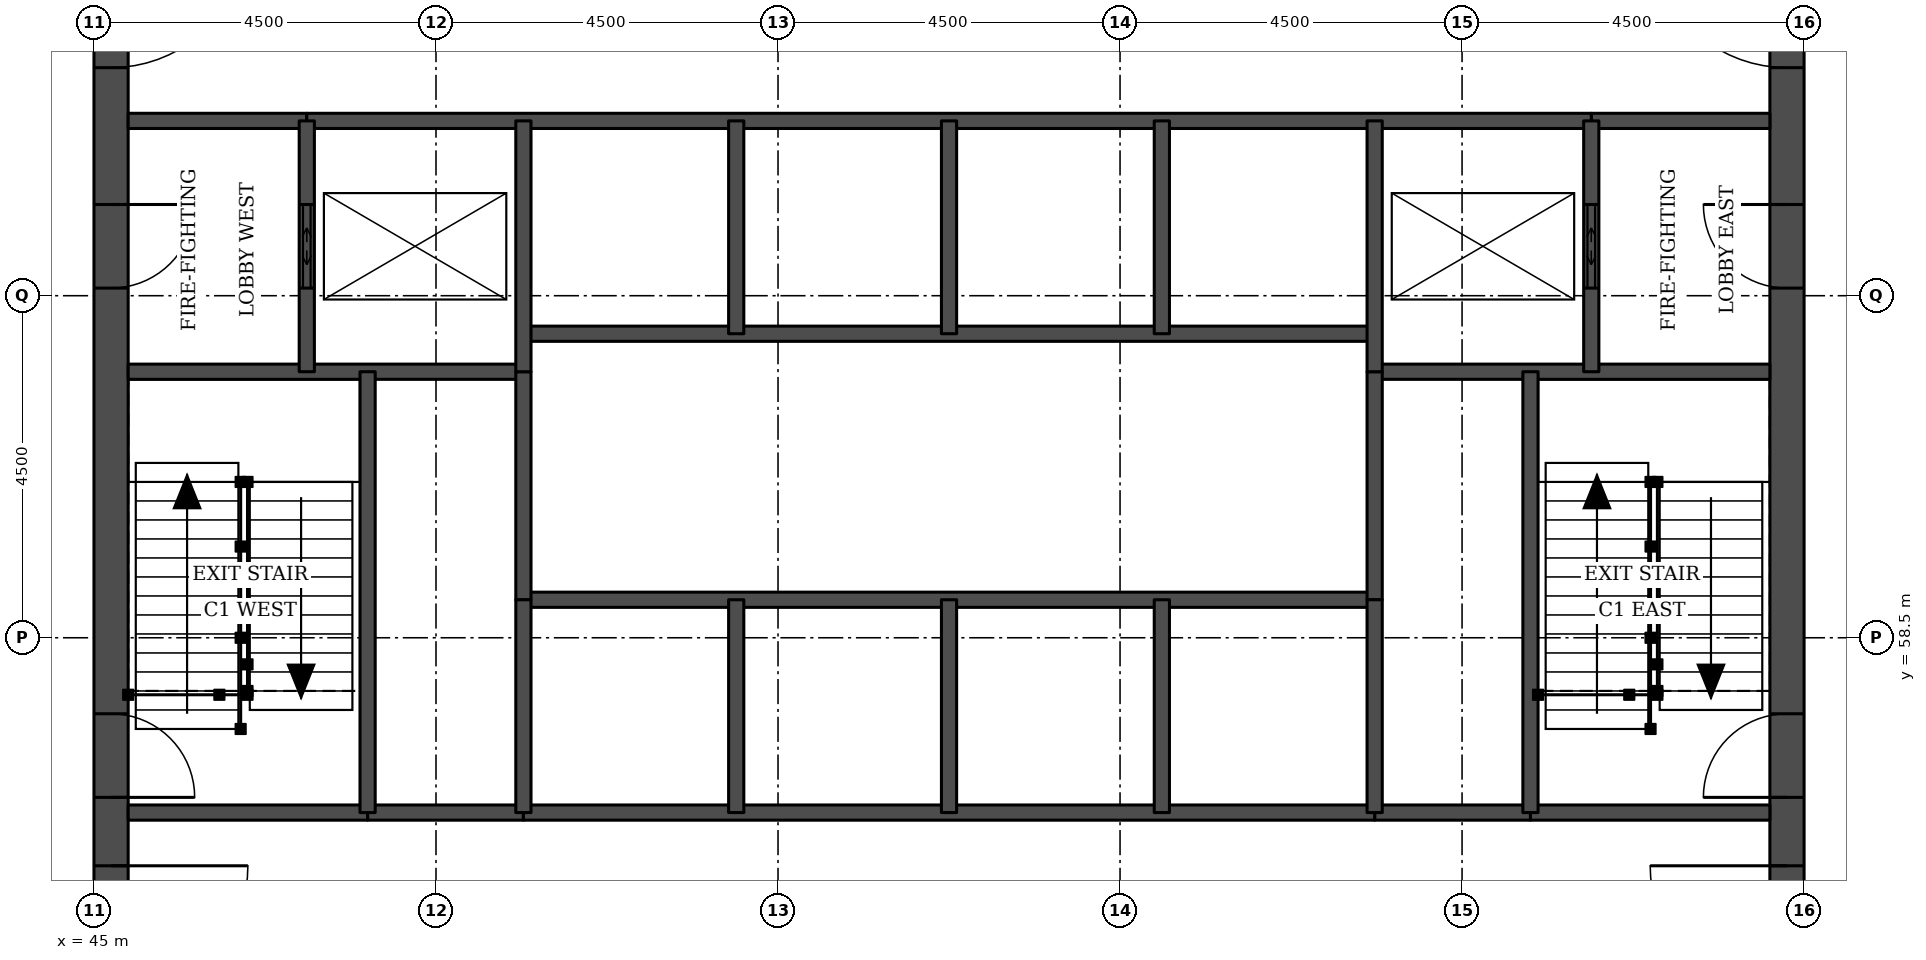
"""IFC4 building model, lengths in metres.
Left out: names, types, materials, properties, quantities, classifications, styles, units other than length and angle.
Written with IfcOpenShell. Run it as: python <this file> out.ifc"""

import sys

from ifc_helpers import new_model, si_unit, direction, frame, frame_2d, origin, place, context, subcontext, project, spatial, rectangle, extrude, element, fill, save


model = new_model("IFC4")
c1 = context("Model", 3, precision=1e-05, world=origin(), true_north=direction((0.0, 1.0)))
c2 = subcontext(c1, "Body", "Model", "MODEL_VIEW")
j1 = project(units=[si_unit("LENGTHUNIT", "METRE"), si_unit("PLANEANGLEUNIT", "RADIAN")], contexts=[c1])
p1 = place(None, origin())
s1 = spatial("IfcSite", under=j1, at=p1, CompositionType="ELEMENT")
p2 = place(p1, origin())
s2 = spatial("IfcBuilding", under=s1, at=p2, CompositionType="ELEMENT")
p3 = place(p2, frame((0.0, 0.0, 130.7)))
s3 = spatial("IfcBuildingStorey", under=s2, at=p3, CompositionType="ELEMENT", Elevation=130.7)
p4 = place(p3, frame((45.225, 49.5, 0.0), z_axis=(0.0, 0.0, 1.0), x_axis=(0.0, 1.0, 0.0)))
e1 = element("IfcWall", 1, at=p4, inside=s3, PredefinedType="SHEAR", context=c2, shape_type="SweptSolid", body=[
    extrude(rectangle(XDim=22.5, YDim=0.45, at=frame_2d((11.25, 0.0))), origin(), (0.0, 0.0, 1.0), 3.7),
])
p5 = place(p4, frame((4.2, 0.0, 0.0)))
e2 = element("IfcOpeningElement", 2, at=p5, cuts=e1, PredefinedType="OPENING", context=c2, shape_type="SweptSolid", body=[
    extrude(rectangle(XDim=1.8, YDim=2.1, at=frame_2d((0.9, 1.05))), frame((0.0, 0.235, 0.0), z_axis=(0.0, -1.0, 0.0), x_axis=(1.0, 0.0, 0.0)), (0.0, 0.0, 1.0), 0.47),
])
p6 = place(p4, frame((6.9, 0.0, 0.0)))
e3 = element("IfcOpeningElement", 3, at=p6, cuts=e1, PredefinedType="OPENING", context=c2, shape_type="SweptSolid", body=[
    extrude(rectangle(XDim=1.1, YDim=2.1, at=frame_2d((0.55, 1.05))), frame((0.0, 0.235, 0.0), z_axis=(0.0, -1.0, 0.0), x_axis=(1.0, 0.0, 0.0)), (0.0, 0.0, 1.0), 0.47),
])
p7 = place(p4, frame((13.6, 0.0, 0.0)))
e4 = element("IfcOpeningElement", 4, at=p7, cuts=e1, PredefinedType="OPENING", context=c2, shape_type="SweptSolid", body=[
    extrude(rectangle(XDim=1.1, YDim=2.1, at=frame_2d((0.55, 1.05))), frame((0.0, 0.235, 0.0), z_axis=(0.0, -1.0, 0.0), x_axis=(1.0, 0.0, 0.0)), (0.0, 0.0, 1.0), 0.47),
])
p8 = place(p4, frame((16.5, 0.0, 0.0)))
e5 = element("IfcOpeningElement", 5, at=p8, cuts=e1, PredefinedType="OPENING", context=c2, shape_type="SweptSolid", body=[
    extrude(rectangle(XDim=1.8, YDim=2.1, at=frame_2d((0.9, 1.05))), frame((0.0, 0.235, 0.0), z_axis=(0.0, -1.0, 0.0), x_axis=(1.0, 0.0, 0.0)), (0.0, 0.0, 1.0), 0.47),
])
p9 = place(p3, frame((67.275, 49.5, 0.0), z_axis=(0.0, 0.0, 1.0), x_axis=(0.0, 1.0, 0.0)))
e6 = element("IfcWall", 6, at=p9, inside=s3, PredefinedType="SHEAR", context=c2, shape_type="SweptSolid", body=[
    extrude(rectangle(XDim=22.5, YDim=0.45, at=frame_2d((11.25, 0.0))), origin(), (0.0, 0.0, 1.0), 3.7),
])
p10 = place(p9, frame((4.2, 0.0, 0.0)))
e7 = element("IfcOpeningElement", 7, at=p10, cuts=e6, PredefinedType="OPENING", context=c2, shape_type="SweptSolid", body=[
    extrude(rectangle(XDim=1.8, YDim=2.1, at=frame_2d((0.9, 1.05))), frame((0.0, 0.235, 0.0), z_axis=(0.0, -1.0, 0.0), x_axis=(1.0, 0.0, 0.0)), (0.0, 0.0, 1.0), 0.47),
])
p11 = place(p9, frame((6.9, 0.0, 0.0)))
e8 = element("IfcOpeningElement", 8, at=p11, cuts=e6, PredefinedType="OPENING", context=c2, shape_type="SweptSolid", body=[
    extrude(rectangle(XDim=1.1, YDim=2.1, at=frame_2d((0.55, 1.05))), frame((0.0, 0.235, 0.0), z_axis=(0.0, -1.0, 0.0), x_axis=(1.0, 0.0, 0.0)), (0.0, 0.0, 1.0), 0.47),
])
p12 = place(p9, frame((13.6, 0.0, 0.0)))
e9 = element("IfcOpeningElement", 9, at=p12, cuts=e6, PredefinedType="OPENING", context=c2, shape_type="SweptSolid", body=[
    extrude(rectangle(XDim=1.1, YDim=2.1, at=frame_2d((0.55, 1.05))), frame((0.0, 0.235, 0.0), z_axis=(0.0, -1.0, 0.0), x_axis=(1.0, 0.0, 0.0)), (0.0, 0.0, 1.0), 0.47),
])
p13 = place(p9, frame((16.5, 0.0, 0.0)))
e10 = element("IfcOpeningElement", 10, at=p13, cuts=e6, PredefinedType="OPENING", context=c2, shape_type="SweptSolid", body=[
    extrude(rectangle(XDim=1.8, YDim=2.1, at=frame_2d((0.9, 1.05))), frame((0.0, 0.235, 0.0), z_axis=(0.0, -1.0, 0.0), x_axis=(1.0, 0.0, 0.0)), (0.0, 0.0, 1.0), 0.47),
])
for number, where, z_axis, x_axis in (
    (11, (48.6, 56.2, 0.0), (0.0, 0.0, 1.0), (1.0, 0.0, 0.0)),
    (12, (61.85, 56.2, 0.0), (0.0, 0.0, 1.0), (1.0, 0.0, 0.0)),
):
    element("IfcWall", number, at=place(p3, frame(where, z_axis=z_axis, x_axis=x_axis)), inside=s3, PredefinedType="SOLIDWALL", context=c2, shape_type="SweptSolid", body=[
        extrude(rectangle(XDim=2.05, YDim=0.2, at=frame_2d((1.025, 0.0))), origin(), (0.0, 0.0, 1.0), 3.55),
    ])
p14 = place(p3, frame((45.45, 56.2, 0.0), z_axis=(0.0, 0.0, 1.0), x_axis=(1.0, 0.0, 0.0)))
e13 = element("IfcWall", 13, at=p14, inside=s3, PredefinedType="SOLIDWALL", context=c2, shape_type="SweptSolid", body=[
    extrude(rectangle(XDim=3.15, YDim=0.2, at=frame_2d((1.575, 0.0))), origin(), (0.0, 0.0, 1.0), 3.55),
])
p15 = place(p3, frame((50.65, 56.2, 0.0), z_axis=(0.0, 0.0, 1.0), x_axis=(1.0, 0.0, 0.0)))
e14 = element("IfcWall", 14, at=p15, inside=s3, PredefinedType="SOLIDWALL", context=c2, shape_type="SweptSolid", body=[
    extrude(rectangle(XDim=11.2, YDim=0.2, at=frame_2d((5.6, 0.0))), origin(), (0.0, 0.0, 1.0), 3.55),
])
p16 = place(p3, frame((63.9, 56.2, 0.0), z_axis=(0.0, 0.0, 1.0), x_axis=(1.0, 0.0, 0.0)))
e15 = element("IfcWall", 15, at=p16, inside=s3, PredefinedType="SOLIDWALL", context=c2, shape_type="SweptSolid", body=[
    extrude(rectangle(XDim=3.15, YDim=0.2, at=frame_2d((1.575, 0.0))), origin(), (0.0, 0.0, 1.0), 3.55),
])
p17 = place(p3, frame((50.65, 59.0, 0.0), z_axis=(0.0, 0.0, 1.0), x_axis=(1.0, 0.0, 0.0)))
e16 = element("IfcWall", 16, at=p17, inside=s3, PredefinedType="SOLIDWALL", context=c2, shape_type="SweptSolid", body=[
    extrude(rectangle(XDim=11.2, YDim=0.2, at=frame_2d((5.6, 0.0))), origin(), (0.0, 0.0, 1.0), 3.7),
])
for number, where, z_axis, x_axis in (
    (17, (45.45, 62.0, 0.0), (0.0, 0.0, 1.0), (1.0, 0.0, 0.0)),
    (18, (61.85, 62.0, 0.0), (0.0, 0.0, 1.0), (1.0, 0.0, 0.0)),
):
    element("IfcWall", number, at=place(p3, frame(where, z_axis=z_axis, x_axis=x_axis)), inside=s3, PredefinedType="SOLIDWALL", context=c2, shape_type="SweptSolid", body=[
        extrude(rectangle(XDim=5.2, YDim=0.2, at=frame_2d((2.6, 0.0))), origin(), (0.0, 0.0, 1.0), 3.55),
    ])
p18 = place(p3, frame((50.65, 62.5, 0.0), z_axis=(0.0, 0.0, 1.0), x_axis=(1.0, 0.0, 0.0)))
e19 = element("IfcWall", 19, at=p18, inside=s3, PredefinedType="SOLIDWALL", context=c2, shape_type="SweptSolid", body=[
    extrude(rectangle(XDim=11.2, YDim=0.2, at=frame_2d((5.6, 0.0))), origin(), (0.0, 0.0, 1.0), 3.7),
])
for number, where, z_axis, x_axis in (
    (20, (45.45, 65.3, 0.0), (0.0, 0.0, 1.0), (1.0, 0.0, 0.0)),
    (21, (64.7, 65.3, 0.0), (0.0, 0.0, 1.0), (1.0, 0.0, 0.0)),
):
    element("IfcWall", number, at=place(p3, frame(where, z_axis=z_axis, x_axis=x_axis)), inside=s3, PredefinedType="SOLIDWALL", context=c2, shape_type="SweptSolid", body=[
        extrude(rectangle(XDim=2.35, YDim=0.2, at=frame_2d((1.175, 0.0))), origin(), (0.0, 0.0, 1.0), 3.55),
    ])
p19 = place(p3, frame((47.8, 65.3, 0.0), z_axis=(0.0, 0.0, 1.0), x_axis=(1.0, 0.0, 0.0)))
e22 = element("IfcWall", 22, at=p19, inside=s3, PredefinedType="SOLIDWALL", context=c2, shape_type="SweptSolid", body=[
    extrude(rectangle(XDim=16.9, YDim=0.2, at=frame_2d((8.45, 0.0))), origin(), (0.0, 0.0, 1.0), 3.55),
])
p20 = place(p3, frame((47.8, 62.0, 0.0), z_axis=(0.0, 0.0, 1.0), x_axis=(0.0, 1.0, 0.0)))
e23 = element("IfcWall", 23, at=p20, inside=s3, PredefinedType="SOLIDWALL", context=c2, shape_type="SweptSolid", body=[
    extrude(rectangle(XDim=3.3, YDim=0.2, at=frame_2d((1.65, 0.0))), origin(), (0.0, 0.0, 1.0), 3.55),
])
p21 = place(p20, frame((1.1, 0.0, 0.0)))
e24 = element("IfcOpeningElement", 24, at=p21, cuts=e23, PredefinedType="OPENING", context=c2, shape_type="SweptSolid", body=[
    extrude(rectangle(XDim=1.1, YDim=2.1, at=frame_2d((0.55, 1.05))), frame((0.0, 0.11, 0.0), z_axis=(0.0, -1.0, 0.0), x_axis=(1.0, 0.0, 0.0)), (0.0, 0.0, 1.0), 0.22),
])
p22 = place(p3, frame((48.6, 56.2, 0.0), z_axis=(0.0, 0.0, 1.0), x_axis=(0.0, 1.0, 0.0)))
e25 = element("IfcWall", 25, at=p22, inside=s3, PredefinedType="SOLIDWALL", context=c2, shape_type="SweptSolid", body=[
    extrude(rectangle(XDim=5.8, YDim=0.2, at=frame_2d((2.9, 0.0))), origin(), (0.0, 0.0, 1.0), 3.55),
])
p23 = place(p3, frame((50.65, 59.0, 0.0), z_axis=(0.0, 0.0, 1.0), x_axis=(0.0, 1.0, 0.0)))
e26 = element("IfcWall", 26, at=p23, inside=s3, PredefinedType="SOLIDWALL", context=c2, shape_type="SweptSolid", body=[
    extrude(rectangle(XDim=3.0, YDim=0.2, at=frame_2d((1.5, 0.0))), origin(), (0.0, 0.0, 1.0), 3.7),
])
p24 = place(p3, frame((50.65, 56.2, 0.0), z_axis=(0.0, 0.0, 1.0), x_axis=(0.0, 1.0, 0.0)))
e27 = element("IfcWall", 27, at=p24, inside=s3, PredefinedType="SOLIDWALL", context=c2, shape_type="SweptSolid", body=[
    extrude(rectangle(XDim=2.8, YDim=0.2, at=frame_2d((1.4, 0.0))), origin(), (0.0, 0.0, 1.0), 3.55),
])
p25 = place(p3, frame((50.65, 62.0, 0.0), z_axis=(0.0, 0.0, 1.0), x_axis=(0.0, 1.0, 0.0)))
e28 = element("IfcWall", 28, at=p25, inside=s3, PredefinedType="SOLIDWALL", context=c2, shape_type="SweptSolid", body=[
    extrude(rectangle(XDim=3.3, YDim=0.2, at=frame_2d((1.65, 0.0))), origin(), (0.0, 0.0, 1.0), 3.55),
])
for number, where, z_axis, x_axis in (
    (29, (53.45, 56.2, 0.0), (0.0, 0.0, 1.0), (0.0, 1.0, 0.0)),
    (30, (53.45, 62.5, 0.0), (0.0, 0.0, 1.0), (0.0, 1.0, 0.0)),
    (31, (56.25, 56.2, 0.0), (0.0, 0.0, 1.0), (0.0, 1.0, 0.0)),
    (32, (56.25, 62.5, 0.0), (0.0, 0.0, 1.0), (0.0, 1.0, 0.0)),
    (33, (59.05, 56.2, 0.0), (0.0, 0.0, 1.0), (0.0, 1.0, 0.0)),
    (34, (59.05, 62.5, 0.0), (0.0, 0.0, 1.0), (0.0, 1.0, 0.0)),
):
    element("IfcWall", number, at=place(p3, frame(where, z_axis=z_axis, x_axis=x_axis)), inside=s3, PredefinedType="SOLIDWALL", context=c2, shape_type="SweptSolid", body=[
        extrude(rectangle(XDim=2.8, YDim=0.2, at=frame_2d((1.4, 0.0))), origin(), (0.0, 0.0, 1.0), 3.55),
    ])
p26 = place(p3, frame((61.85, 59.0, 0.0), z_axis=(0.0, 0.0, 1.0), x_axis=(0.0, 1.0, 0.0)))
e35 = element("IfcWall", 35, at=p26, inside=s3, PredefinedType="SOLIDWALL", context=c2, shape_type="SweptSolid", body=[
    extrude(rectangle(XDim=3.0, YDim=0.2, at=frame_2d((1.5, 0.0))), origin(), (0.0, 0.0, 1.0), 3.7),
])
p27 = place(p3, frame((61.85, 56.2, 0.0), z_axis=(0.0, 0.0, 1.0), x_axis=(0.0, 1.0, 0.0)))
e36 = element("IfcWall", 36, at=p27, inside=s3, PredefinedType="SOLIDWALL", context=c2, shape_type="SweptSolid", body=[
    extrude(rectangle(XDim=2.8, YDim=0.2, at=frame_2d((1.4, 0.0))), origin(), (0.0, 0.0, 1.0), 3.55),
])
p28 = place(p3, frame((61.85, 62.0, 0.0), z_axis=(0.0, 0.0, 1.0), x_axis=(0.0, 1.0, 0.0)))
e37 = element("IfcWall", 37, at=p28, inside=s3, PredefinedType="SOLIDWALL", context=c2, shape_type="SweptSolid", body=[
    extrude(rectangle(XDim=3.3, YDim=0.2, at=frame_2d((1.65, 0.0))), origin(), (0.0, 0.0, 1.0), 3.55),
])
p29 = place(p3, frame((63.9, 56.2, 0.0), z_axis=(0.0, 0.0, 1.0), x_axis=(0.0, 1.0, 0.0)))
e38 = element("IfcWall", 38, at=p29, inside=s3, PredefinedType="SOLIDWALL", context=c2, shape_type="SweptSolid", body=[
    extrude(rectangle(XDim=5.8, YDim=0.2, at=frame_2d((2.9, 0.0))), origin(), (0.0, 0.0, 1.0), 3.55),
])
p30 = place(p3, frame((64.7, 62.0, 0.0), z_axis=(0.0, 0.0, 1.0), x_axis=(0.0, 1.0, 0.0)))
e39 = element("IfcWall", 39, at=p30, inside=s3, PredefinedType="SOLIDWALL", context=c2, shape_type="SweptSolid", body=[
    extrude(rectangle(XDim=3.3, YDim=0.2, at=frame_2d((1.65, 0.0))), origin(), (0.0, 0.0, 1.0), 3.55),
])
p31 = place(p30, frame((1.1, 0.0, 0.0)))
e40 = element("IfcOpeningElement", 40, at=p31, cuts=e39, PredefinedType="OPENING", context=c2, shape_type="SweptSolid", body=[
    extrude(rectangle(XDim=1.1, YDim=2.1, at=frame_2d((0.55, 1.05))), frame((0.0, 0.11, 0.0), z_axis=(0.0, -1.0, 0.0), x_axis=(1.0, 0.0, 0.0)), (0.0, 0.0, 1.0), 0.22),
])
p32 = place(p21, origin())
e41 = element("IfcDoor", 41, at=p32, inside=s3, OperationType="DOUBLE_DOOR_SLIDING", PredefinedType="DOOR", context=c2, shape_type="SweptSolid", body=[
    extrude(rectangle(XDim=1.1, YDim=2.1, at=frame_2d((0.55, 1.05))), frame((0.0, 0.025, 0.0), z_axis=(0.0, -1.0, 0.0), x_axis=(1.0, 0.0, 0.0)), (0.0, 0.0, 1.0), 0.05),
])
fill(e24, e41)
p33 = place(p31, origin())
e42 = element("IfcDoor", 42, at=p33, inside=s3, OperationType="DOUBLE_DOOR_SLIDING", PredefinedType="DOOR", context=c2, shape_type="SweptSolid", body=[
    extrude(rectangle(XDim=1.1, YDim=2.1, at=frame_2d((0.55, 1.05))), frame((0.0, 0.025, 0.0), z_axis=(0.0, -1.0, 0.0), x_axis=(1.0, 0.0, 0.0)), (0.0, 0.0, 1.0), 0.05),
])
fill(e40, e42)
p34 = place(p5, frame((1.8, 0.0, 0.0), z_axis=(0.0, 0.0, 1.0), x_axis=(-1.0, 0.0, 0.0)))
e43 = element("IfcDoor", 43, at=p34, inside=s3, OperationType="SINGLE_SWING_LEFT", PredefinedType="DOOR", context=c2, shape_type="SweptSolid", body=[
    extrude(rectangle(XDim=1.8, YDim=2.1, at=frame_2d((0.9, 1.05))), frame((0.0, 0.025, 0.0), z_axis=(0.0, -1.0, 0.0), x_axis=(1.0, 0.0, 0.0)), (0.0, 0.0, 1.0), 0.05),
])
fill(e2, e43)
p35 = place(p6, frame((1.1, 0.0, 0.0), z_axis=(0.0, 0.0, 1.0), x_axis=(-1.0, 0.0, 0.0)))
e44 = element("IfcDoor", 44, at=p35, inside=s3, OperationType="SINGLE_SWING_RIGHT", PredefinedType="DOOR", context=c2, shape_type="SweptSolid", body=[
    extrude(rectangle(XDim=1.1, YDim=2.1, at=frame_2d((0.55, 1.05))), frame((0.0, 0.025, 0.0), z_axis=(0.0, -1.0, 0.0), x_axis=(1.0, 0.0, 0.0)), (0.0, 0.0, 1.0), 0.05),
])
fill(e3, e44)
p36 = place(p7, frame((1.1, 0.0, 0.0), z_axis=(0.0, 0.0, 1.0), x_axis=(-1.0, 0.0, 0.0)))
e45 = element("IfcDoor", 45, at=p36, inside=s3, OperationType="SINGLE_SWING_LEFT", PredefinedType="DOOR", context=c2, shape_type="SweptSolid", body=[
    extrude(rectangle(XDim=1.1, YDim=2.1, at=frame_2d((0.55, 1.05))), frame((0.0, 0.025, 0.0), z_axis=(0.0, -1.0, 0.0), x_axis=(1.0, 0.0, 0.0)), (0.0, 0.0, 1.0), 0.05),
])
fill(e4, e45)
p37 = place(p8, frame((1.8, 0.0, 0.0), z_axis=(0.0, 0.0, 1.0), x_axis=(-1.0, 0.0, 0.0)))
e46 = element("IfcDoor", 46, at=p37, inside=s3, OperationType="SINGLE_SWING_LEFT", PredefinedType="DOOR", context=c2, shape_type="SweptSolid", body=[
    extrude(rectangle(XDim=1.8, YDim=2.1, at=frame_2d((0.9, 1.05))), frame((0.0, 0.025, 0.0), z_axis=(0.0, -1.0, 0.0), x_axis=(1.0, 0.0, 0.0)), (0.0, 0.0, 1.0), 0.05),
])
fill(e5, e46)
p38 = place(p10, origin())
e47 = element("IfcDoor", 47, at=p38, inside=s3, OperationType="SINGLE_SWING_RIGHT", PredefinedType="DOOR", context=c2, shape_type="SweptSolid", body=[
    extrude(rectangle(XDim=1.8, YDim=2.1, at=frame_2d((0.9, 1.05))), frame((0.0, 0.025, 0.0), z_axis=(0.0, -1.0, 0.0), x_axis=(1.0, 0.0, 0.0)), (0.0, 0.0, 1.0), 0.05),
])
fill(e7, e47)
p39 = place(p11, origin())
e48 = element("IfcDoor", 48, at=p39, inside=s3, OperationType="SINGLE_SWING_LEFT", PredefinedType="DOOR", context=c2, shape_type="SweptSolid", body=[
    extrude(rectangle(XDim=1.1, YDim=2.1, at=frame_2d((0.55, 1.05))), frame((0.0, 0.025, 0.0), z_axis=(0.0, -1.0, 0.0), x_axis=(1.0, 0.0, 0.0)), (0.0, 0.0, 1.0), 0.05),
])
fill(e8, e48)
p40 = place(p12, origin())
e49 = element("IfcDoor", 49, at=p40, inside=s3, OperationType="SINGLE_SWING_RIGHT", PredefinedType="DOOR", context=c2, shape_type="SweptSolid", body=[
    extrude(rectangle(XDim=1.1, YDim=2.1, at=frame_2d((0.55, 1.05))), frame((0.0, 0.025, 0.0), z_axis=(0.0, -1.0, 0.0), x_axis=(1.0, 0.0, 0.0)), (0.0, 0.0, 1.0), 0.05),
])
fill(e9, e49)
p41 = place(p13, origin())
e50 = element("IfcDoor", 50, at=p41, inside=s3, OperationType="SINGLE_SWING_RIGHT", PredefinedType="DOOR", context=c2, shape_type="SweptSolid", body=[
    extrude(rectangle(XDim=1.8, YDim=2.1, at=frame_2d((0.9, 1.05))), frame((0.0, 0.025, 0.0), z_axis=(0.0, -1.0, 0.0), x_axis=(1.0, 0.0, 0.0)), (0.0, 0.0, 1.0), 0.05),
])
fill(e10, e50)
save(model, sys.argv[1])
